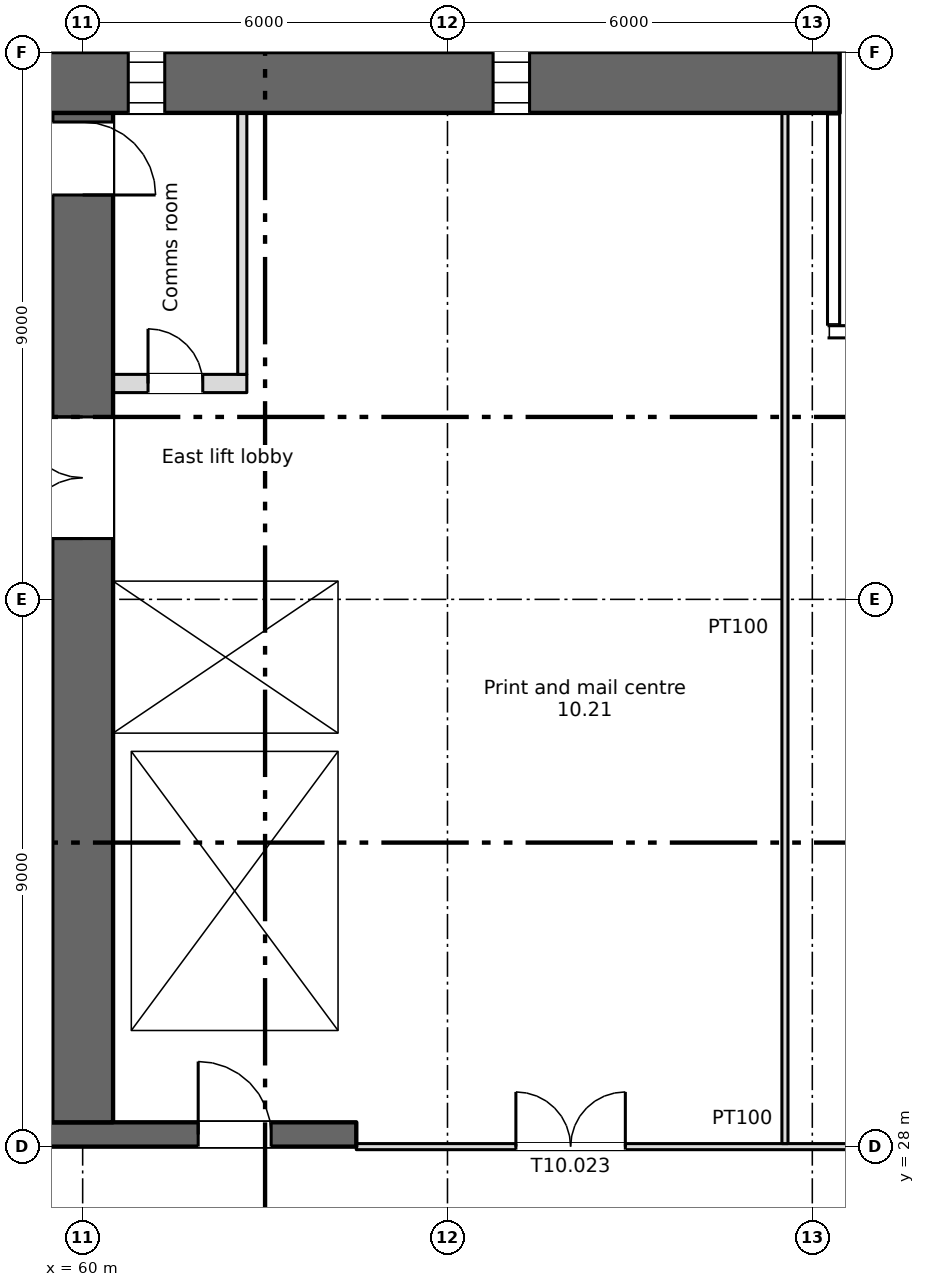
"""IFC4 building model, lengths in metres.
Left out: names, types, materials, properties, quantities, classifications, styles, units other than length and angle.
Written with IfcOpenShell. Run it as: python <this file> out.ifc"""

import sys

from ifc_helpers import new_model, si_unit, direction, frame, frame_2d, origin, place, context, subcontext, project, spatial, rectangle, extrude, element, fill, save


model = new_model("IFC4")
c1 = context("Model", 3, precision=1e-05, world=origin(), true_north=direction((0.0, 1.0)))
c2 = subcontext(c1, "Body", "Model", "MODEL_VIEW")
j1 = project(units=[si_unit("LENGTHUNIT", "METRE"), si_unit("PLANEANGLEUNIT", "RADIAN")], contexts=[c1])
p1 = place(None, origin())
s1 = spatial("IfcSite", under=j1, at=p1, CompositionType="ELEMENT")
p2 = place(p1, origin())
s2 = spatial("IfcBuilding", under=s1, at=p2, CompositionType="ELEMENT")
p3 = place(p2, frame((0.0, 0.0, 45.0)))
s3 = spatial("IfcBuildingStorey", under=s2, at=p3, CompositionType="ELEMENT", Elevation=45.0)
p4 = place(p3, frame((5.55, 45.5, 0.0), z_axis=(0.0, 0.0, 1.0), x_axis=(1.0, 0.0, 0.0)))
e1 = element("IfcWall", 1, at=p4, inside=s3, PredefinedType="SHEAR", context=c2, shape_type="SweptSolid", body=[
    extrude(rectangle(XDim=66.9, YDim=1.0, at=frame_2d((33.45, 0.0))), origin(), (0.0, 0.0, 1.0), 3.35),
])
p5 = place(p4, frame((1.2, 0.0, 0.6)))
e2 = element("IfcOpeningElement", 2, at=p5, cuts=e1, PredefinedType="OPENING", context=c2, shape_type="SweptSolid", body=[
    extrude(rectangle(XDim=0.6, YDim=2.4, at=frame_2d((0.3, 1.2))), frame((0.0, 0.51, 0.0), z_axis=(0.0, -1.0, 0.0), x_axis=(1.0, 0.0, 0.0)), (0.0, 0.0, 1.0), 1.02),
])
p6 = place(p4, frame((7.2, 0.0, 0.6)))
e3 = element("IfcOpeningElement", 3, at=p6, cuts=e1, PredefinedType="OPENING", context=c2, shape_type="SweptSolid", body=[
    extrude(rectangle(XDim=0.6, YDim=2.4, at=frame_2d((0.3, 1.2))), frame((0.0, 0.51, 0.0), z_axis=(0.0, -1.0, 0.0), x_axis=(1.0, 0.0, 0.0)), (0.0, 0.0, 1.0), 1.02),
])
p7 = place(p4, frame((55.2, 0.0, 0.6)))
e4 = element("IfcOpeningElement", 4, at=p7, cuts=e1, PredefinedType="OPENING", context=c2, shape_type="SweptSolid", body=[
    extrude(rectangle(XDim=0.6, YDim=2.4, at=frame_2d((0.3, 1.2))), frame((0.0, 0.51, 0.0), z_axis=(0.0, -1.0, 0.0), x_axis=(1.0, 0.0, 0.0)), (0.0, 0.0, 1.0), 1.02),
])
p8 = place(p4, frame((61.2, 0.0, 0.6)))
e5 = element("IfcOpeningElement", 5, at=p8, cuts=e1, PredefinedType="OPENING", context=c2, shape_type="SweptSolid", body=[
    extrude(rectangle(XDim=0.6, YDim=2.4, at=frame_2d((0.3, 1.2))), frame((0.0, 0.51, 0.0), z_axis=(0.0, -1.0, 0.0), x_axis=(1.0, 0.0, 0.0)), (0.0, 0.0, 1.0), 1.02),
])
p9 = place(p3, frame((6.7, 28.2, 0.0), z_axis=(0.0, 0.0, 1.0), x_axis=(1.0, 0.0, 0.0)))
e6 = element("IfcWall", 6, at=p9, inside=s3, PredefinedType="SHEAR", context=c2, shape_type="SweptSolid", body=[
    extrude(rectangle(XDim=57.8, YDim=0.4, at=frame_2d((28.9, 0.0))), origin(), (0.0, 0.0, 1.0), 3.35),
])
p10 = place(p9, frame((12.812, 0.0, 0.0)))
e7 = element("IfcOpeningElement", 7, at=p10, cuts=e6, PredefinedType="OPENING", context=c2, shape_type="SweptSolid", body=[
    extrude(rectangle(XDim=0.9, YDim=2.1, at=frame_2d((0.45, 1.05))), frame((0.0, 0.21, 0.0), z_axis=(0.0, -1.0, 0.0), x_axis=(1.0, 0.0, 0.0)), (0.0, 0.0, 1.0), 0.42),
])
p11 = place(p9, frame((15.387, 0.0, 0.0)))
e8 = element("IfcOpeningElement", 8, at=p11, cuts=e6, PredefinedType="OPENING", context=c2, shape_type="SweptSolid", body=[
    extrude(rectangle(XDim=0.9, YDim=2.1, at=frame_2d((0.45, 1.05))), frame((0.0, 0.21, 0.0), z_axis=(0.0, -1.0, 0.0), x_axis=(1.0, 0.0, 0.0)), (0.0, 0.0, 1.0), 0.42),
])
p12 = place(p9, frame((48.312, 0.0, 0.0)))
e9 = element("IfcOpeningElement", 9, at=p12, cuts=e6, PredefinedType="OPENING", context=c2, shape_type="SweptSolid", body=[
    extrude(rectangle(XDim=0.9, YDim=2.1, at=frame_2d((0.45, 1.05))), frame((0.0, 0.21, 0.0), z_axis=(0.0, -1.0, 0.0), x_axis=(1.0, 0.0, 0.0)), (0.0, 0.0, 1.0), 0.42),
])
p13 = place(p9, frame((50.887, 0.0, 0.0)))
e10 = element("IfcOpeningElement", 10, at=p13, cuts=e6, PredefinedType="OPENING", context=c2, shape_type="SweptSolid", body=[
    extrude(rectangle(XDim=0.9, YDim=2.1, at=frame_2d((0.45, 1.05))), frame((0.0, 0.21, 0.0), z_axis=(0.0, -1.0, 0.0), x_axis=(1.0, 0.0, 0.0)), (0.0, 0.0, 1.0), 0.42),
])
p14 = place(p9, frame((0.562, 0.0, 0.0)))
e11 = element("IfcOpeningElement", 11, at=p14, cuts=e6, PredefinedType="OPENING", context=c2, shape_type="SweptSolid", body=[
    extrude(rectangle(XDim=0.9, YDim=2.1, at=frame_2d((0.45, 1.05))), frame((0.0, 0.21, 0.0), z_axis=(0.0, -1.0, 0.0), x_axis=(1.0, 0.0, 0.0)), (0.0, 0.0, 1.0), 0.42),
])
p15 = place(p9, frame((2.137, 0.0, 0.0)))
e12 = element("IfcOpeningElement", 12, at=p15, cuts=e6, PredefinedType="OPENING", context=c2, shape_type="SweptSolid", body=[
    extrude(rectangle(XDim=0.9, YDim=2.1, at=frame_2d((0.45, 1.05))), frame((0.0, 0.21, 0.0), z_axis=(0.0, -1.0, 0.0), x_axis=(1.0, 0.0, 0.0)), (0.0, 0.0, 1.0), 0.42),
])
p16 = place(p9, frame((4.7, 0.0, 0.0)))
e13 = element("IfcOpeningElement", 13, at=p16, cuts=e6, PredefinedType="OPENING", context=c2, shape_type="SweptSolid", body=[
    extrude(rectangle(XDim=1.2, YDim=2.1, at=frame_2d((0.6, 1.05))), frame((0.0, 0.21, 0.0), z_axis=(0.0, -1.0, 0.0), x_axis=(1.0, 0.0, 0.0)), (0.0, 0.0, 1.0), 0.42),
])
p17 = place(p9, frame((31.7, 0.0, 0.0)))
e14 = element("IfcOpeningElement", 14, at=p17, cuts=e6, PredefinedType="OPENING", context=c2, shape_type="SweptSolid", body=[
    extrude(rectangle(XDim=1.2, YDim=2.1, at=frame_2d((0.6, 1.05))), frame((0.0, 0.21, 0.0), z_axis=(0.0, -1.0, 0.0), x_axis=(1.0, 0.0, 0.0)), (0.0, 0.0, 1.0), 0.42),
])
p18 = place(p9, frame((55.2, 0.0, 0.0)))
e15 = element("IfcOpeningElement", 15, at=p18, cuts=e6, PredefinedType="OPENING", context=c2, shape_type="SweptSolid", body=[
    extrude(rectangle(XDim=1.2, YDim=2.1, at=frame_2d((0.6, 1.05))), frame((0.0, 0.21, 0.0), z_axis=(0.0, -1.0, 0.0), x_axis=(1.0, 0.0, 0.0)), (0.0, 0.0, 1.0), 0.42),
])
p19 = place(p9, frame((21.7, 0.0, 0.0)))
e16 = element("IfcOpeningElement", 16, at=p19, cuts=e6, PredefinedType="OPENING", context=c2, shape_type="SweptSolid", body=[
    extrude(rectangle(XDim=1.2, YDim=2.1, at=frame_2d((0.6, 1.05))), frame((0.0, 0.21, 0.0), z_axis=(0.0, -1.0, 0.0), x_axis=(1.0, 0.0, 0.0)), (0.0, 0.0, 1.0), 0.42),
])
p20 = place(p9, frame((41.7, 0.0, 0.0)))
e17 = element("IfcOpeningElement", 17, at=p20, cuts=e6, PredefinedType="OPENING", context=c2, shape_type="SweptSolid", body=[
    extrude(rectangle(XDim=1.2, YDim=2.1, at=frame_2d((0.6, 1.05))), frame((0.0, 0.21, 0.0), z_axis=(0.0, -1.0, 0.0), x_axis=(1.0, 0.0, 0.0)), (0.0, 0.0, 1.0), 0.42),
])
p21 = place(p9, frame((24.85, 0.0, 0.0)))
e18 = element("IfcOpeningElement", 18, at=p21, cuts=e6, PredefinedType="OPENING", context=c2, shape_type="SweptSolid", body=[
    extrude(rectangle(XDim=2.4, YDim=2.1, at=frame_2d((1.2, 1.05))), frame((0.0, 0.21, 0.0), z_axis=(0.0, -1.0, 0.0), x_axis=(1.0, 0.0, 0.0)), (0.0, 0.0, 1.0), 0.42),
])
p22 = place(p9, frame((37.35, 0.0, 0.0)))
e19 = element("IfcOpeningElement", 19, at=p22, cuts=e6, PredefinedType="OPENING", context=c2, shape_type="SweptSolid", body=[
    extrude(rectangle(XDim=2.4, YDim=2.1, at=frame_2d((1.2, 1.05))), frame((0.0, 0.21, 0.0), z_axis=(0.0, -1.0, 0.0), x_axis=(1.0, 0.0, 0.0)), (0.0, 0.0, 1.0), 0.42),
])
p23 = place(p9, frame((7.85, 0.0, 0.0)))
e20 = element("IfcOpeningElement", 20, at=p23, cuts=e6, PredefinedType="OPENING", context=c2, shape_type="SweptSolid", body=[
    extrude(rectangle(XDim=2.4, YDim=2.1, at=frame_2d((1.2, 1.05))), frame((0.0, 0.21, 0.0), z_axis=(0.0, -1.0, 0.0), x_axis=(1.0, 0.0, 0.0)), (0.0, 0.0, 1.0), 0.42),
])
p24 = place(p9, frame((28.85, 0.0, 0.0)))
e21 = element("IfcOpeningElement", 21, at=p24, cuts=e6, PredefinedType="OPENING", context=c2, shape_type="SweptSolid", body=[
    extrude(rectangle(XDim=0.9, YDim=2.1, at=frame_2d((0.45, 1.05))), frame((0.0, 0.21, 0.0), z_axis=(0.0, -1.0, 0.0), x_axis=(1.0, 0.0, 0.0)), (0.0, 0.0, 1.0), 0.42),
])
p25 = place(p9, frame((34.85, 0.0, 0.0)))
e22 = element("IfcOpeningElement", 22, at=p25, cuts=e6, PredefinedType="OPENING", context=c2, shape_type="SweptSolid", body=[
    extrude(rectangle(XDim=0.9, YDim=2.1, at=frame_2d((0.45, 1.05))), frame((0.0, 0.21, 0.0), z_axis=(0.0, -1.0, 0.0), x_axis=(1.0, 0.0, 0.0)), (0.0, 0.0, 1.0), 0.42),
])
p26 = place(p3, frame((64.35, 34.8, 0.0), z_axis=(0.0, 0.0, 1.0), x_axis=(0.0, 1.0, 0.0)))
e23 = element("IfcWall", 23, at=p26, inside=s3, PredefinedType="SHEAR", context=c2, shape_type="SweptSolid", body=[
    extrude(rectangle(XDim=10.2, YDim=0.3, at=frame_2d((5.1, 0.0))), origin(), (0.0, 0.0, 1.0), 3.35),
])
p27 = place(p3, frame((60.0, 28.4, 0.0), z_axis=(0.0, 0.0, 1.0), x_axis=(0.0, 1.0, 0.0)))
e24 = element("IfcWall", 24, at=p27, inside=s3, PredefinedType="SHEAR", context=c2, shape_type="SweptSolid", body=[
    extrude(rectangle(XDim=16.6, YDim=1.0, at=frame_2d((8.3, 0.0))), origin(), (0.0, 0.0, 1.0), 3.35),
])
p28 = place(p27, frame((9.6, 0.0, 0.0)))
e25 = element("IfcOpeningElement", 25, at=p28, cuts=e24, PredefinedType="OPENING", context=c2, shape_type="SweptSolid", body=[
    extrude(rectangle(XDim=2.0, YDim=2.1, at=frame_2d((1.0, 1.05))), frame((0.0, 0.51, 0.0), z_axis=(0.0, -1.0, 0.0), x_axis=(1.0, 0.0, 0.0)), (0.0, 0.0, 1.0), 1.02),
])
p29 = place(p27, frame((15.25, 0.0, 0.0)))
e26 = element("IfcOpeningElement", 26, at=p29, cuts=e24, PredefinedType="OPENING", context=c2, shape_type="SweptSolid", body=[
    extrude(rectangle(XDim=1.2, YDim=2.1, at=frame_2d((0.6, 1.05))), frame((0.0, 0.51, 0.0), z_axis=(0.0, -1.0, 0.0), x_axis=(1.0, 0.0, 0.0)), (0.0, 0.0, 1.0), 1.02),
])
for number, where, z_axis, x_axis in (
    (27, (60.65, 28.4, 0.0), (0.0, 0.0, 1.0), (0.0, 1.0, 0.0)),
    (28, (64.35, 28.4, 0.0), (0.0, 0.0, 1.0), (0.0, 1.0, 0.0)),
):
    element("IfcWall", number, at=place(p3, frame(where, z_axis=z_axis, x_axis=x_axis)), inside=s3, PredefinedType="SHEAR", context=c2, shape_type="SweptSolid", body=[
        extrude(rectangle(XDim=6.1, YDim=0.3, at=frame_2d((3.05, 0.0))), origin(), (0.0, 0.0, 1.0), 3.35),
    ])
p30 = place(p3, frame((47.3, 34.65, 0.0), z_axis=(0.0, 0.0, 1.0), x_axis=(1.0, 0.0, 0.0)))
e29 = element("IfcWall", 29, at=p30, inside=s3, PredefinedType="SHEAR", context=c2, shape_type="SweptSolid", body=[
    extrude(rectangle(XDim=12.2, YDim=0.3, at=frame_2d((6.1, 0.0))), origin(), (0.0, 0.0, 1.0), 3.35),
])
p31 = place(p30, frame((1.3, 0.0, 0.0)))
e30 = element("IfcOpeningElement", 30, at=p31, cuts=e29, PredefinedType="OPENING", context=c2, shape_type="SweptSolid", body=[
    extrude(rectangle(XDim=1.1, YDim=2.1, at=frame_2d((0.55, 1.05))), frame((0.0, 0.16, 0.0), z_axis=(0.0, -1.0, 0.0), x_axis=(1.0, 0.0, 0.0)), (0.0, 0.0, 1.0), 0.32),
])
p32 = place(p3, frame((60.5, 34.65, 0.0), z_axis=(0.0, 0.0, 1.0), x_axis=(1.0, 0.0, 0.0)))
e31 = element("IfcWall", 31, at=p32, inside=s3, PredefinedType="SHEAR", context=c2, shape_type="SweptSolid", body=[
    extrude(rectangle(XDim=4.0, YDim=0.3, at=frame_2d((2.0, 0.0))), origin(), (0.0, 0.0, 1.0), 3.35),
])
p33 = place(p3, frame((60.5, 37.45, 0.0), z_axis=(0.0, 0.0, 1.0), x_axis=(1.0, 0.0, 0.0)))
e32 = element("IfcWall", 32, at=p33, inside=s3, PredefinedType="SHEAR", context=c2, shape_type="SweptSolid", body=[
    extrude(rectangle(XDim=3.7, YDim=0.3, at=frame_2d((1.85, 0.0))), origin(), (0.0, 0.0, 1.0), 3.35),
])
p34 = place(p33, frame((1.3, 0.0, 0.0)))
e33 = element("IfcOpeningElement", 33, at=p34, cuts=e32, PredefinedType="OPENING", context=c2, shape_type="SweptSolid", body=[
    extrude(rectangle(XDim=1.1, YDim=2.1, at=frame_2d((0.55, 1.05))), frame((0.0, 0.16, 0.0), z_axis=(0.0, -1.0, 0.0), x_axis=(1.0, 0.0, 0.0)), (0.0, 0.0, 1.0), 0.32),
])
p35 = place(p3, frame((60.5, 40.55, 0.0), z_axis=(0.0, 0.0, 1.0), x_axis=(1.0, 0.0, 0.0)))
e34 = element("IfcWall", 34, at=p35, inside=s3, PredefinedType="PARTITIONING", context=c2, shape_type="SweptSolid", body=[
    extrude(rectangle(XDim=2.2, YDim=0.3, at=frame_2d((1.1, 0.0))), origin(), (0.0, 0.0, 1.0), 3.35),
])
p36 = place(p35, frame((0.575, 0.0, 0.0)))
e35 = element("IfcOpeningElement", 35, at=p36, cuts=e34, PredefinedType="OPENING", context=c2, shape_type="SweptSolid", body=[
    extrude(rectangle(XDim=0.9, YDim=2.1, at=frame_2d((0.45, 1.05))), frame((0.0, 0.16, 0.0), z_axis=(0.0, -1.0, 0.0), x_axis=(1.0, 0.0, 0.0)), (0.0, 0.0, 1.0), 0.32),
])
p37 = place(p3, frame((62.625, 40.7, 0.0), z_axis=(0.0, 0.0, 1.0), x_axis=(0.0, 1.0, 0.0)))
e36 = element("IfcWall", 36, at=p37, inside=s3, PredefinedType="PARTITIONING", context=c2, shape_type="SweptSolid", body=[
    extrude(rectangle(XDim=4.3, YDim=0.15, at=frame_2d((2.15, 0.0))), origin(), (0.0, 0.0, 1.0), 3.35),
])
p38 = place(p3, frame((64.5, 28.0, 0.0), z_axis=(0.0, 0.0, 1.0), x_axis=(1.0, 0.0, 0.0)))
e37 = element("IfcWall", 37, at=p38, inside=s3, PredefinedType="PARTITIONING", context=c2, shape_type="SweptSolid", body=[
    extrude(rectangle(XDim=12.7, YDim=0.1, at=frame_2d((6.35, 0.0))), origin(), (0.0, 0.0, 1.0), 3.35),
])
p39 = place(p38, frame((8.975, 0.0, 0.0)))
e38 = element("IfcOpeningElement", 38, at=p39, cuts=e37, PredefinedType="OPENING", context=c2, shape_type="SweptSolid", body=[
    extrude(rectangle(XDim=1.8, YDim=2.1, at=frame_2d((0.9, 1.05))), frame((0.0, 0.06, 0.0), z_axis=(0.0, -1.0, 0.0), x_axis=(1.0, 0.0, 0.0)), (0.0, 0.0, 1.0), 0.12),
])
p40 = place(p38, frame((2.625, 0.0, 0.0)))
e39 = element("IfcOpeningElement", 39, at=p40, cuts=e37, PredefinedType="OPENING", context=c2, shape_type="SweptSolid", body=[
    extrude(rectangle(XDim=1.8, YDim=2.1, at=frame_2d((0.9, 1.05))), frame((0.0, 0.06, 0.0), z_axis=(0.0, -1.0, 0.0), x_axis=(1.0, 0.0, 0.0)), (0.0, 0.0, 1.0), 0.12),
])
p41 = place(p3, frame((71.55, 28.05, 0.0), z_axis=(0.0, 0.0, 1.0), x_axis=(0.0, 1.0, 0.0)))
e40 = element("IfcWall", 40, at=p41, inside=s3, PredefinedType="PARTITIONING", context=c2, shape_type="SweptSolid", body=[
    extrude(rectangle(XDim=16.95, YDim=0.1, at=frame_2d((8.475, 0.0))), origin(), (0.0, 0.0, 1.0), 3.35),
])
p42 = place(p7, origin())
e41 = element("IfcWindow", 41, at=p42, inside=s3, PartitioningType="SINGLE_PANEL", PredefinedType="WINDOW", context=c2, shape_type="SweptSolid", body=[
    extrude(rectangle(XDim=0.6, YDim=2.4, at=frame_2d((0.3, 1.2))), frame((0.0, 0.03, 0.0), z_axis=(0.0, -1.0, 0.0), x_axis=(1.0, 0.0, 0.0)), (0.0, 0.0, 1.0), 0.06),
])
fill(e4, e41)
p43 = place(p8, origin())
e42 = element("IfcWindow", 42, at=p43, inside=s3, PartitioningType="SINGLE_PANEL", PredefinedType="WINDOW", context=c2, shape_type="SweptSolid", body=[
    extrude(rectangle(XDim=0.6, YDim=2.4, at=frame_2d((0.3, 1.2))), frame((0.0, 0.03, 0.0), z_axis=(0.0, -1.0, 0.0), x_axis=(1.0, 0.0, 0.0)), (0.0, 0.0, 1.0), 0.06),
])
fill(e5, e42)
p44 = place(p36, origin())
e43 = element("IfcDoor", 43, at=p44, inside=s3, OperationType="SINGLE_SWING_LEFT", PredefinedType="DOOR", context=c2, shape_type="SweptSolid", body=[
    extrude(rectangle(XDim=0.9, YDim=2.1, at=frame_2d((0.45, 1.05))), frame((0.0, 0.025, 0.0), z_axis=(0.0, -1.0, 0.0), x_axis=(1.0, 0.0, 0.0)), (0.0, 0.0, 1.0), 0.05),
])
fill(e35, e43)
p45 = place(p34, origin())
e44 = element("IfcDoor", 44, at=p45, inside=s3, OperationType="SLIDING_TO_LEFT", PredefinedType="DOOR", context=c2, shape_type="SweptSolid", body=[
    extrude(rectangle(XDim=1.1, YDim=2.1, at=frame_2d((0.55, 1.05))), frame((0.0, 0.025, 0.0), z_axis=(0.0, -1.0, 0.0), x_axis=(1.0, 0.0, 0.0)), (0.0, 0.0, 1.0), 0.05),
])
fill(e33, e44)
p46 = place(p18, origin())
e45 = element("IfcDoor", 45, at=p46, inside=s3, OperationType="SINGLE_SWING_LEFT", PredefinedType="DOOR", context=c2, shape_type="SweptSolid", body=[
    extrude(rectangle(XDim=1.2, YDim=2.1, at=frame_2d((0.6, 1.05))), frame((0.0, 0.025, 0.0), z_axis=(0.0, -1.0, 0.0), x_axis=(1.0, 0.0, 0.0)), (0.0, 0.0, 1.0), 0.05),
])
fill(e15, e45)
p47 = place(p28, origin())
e46 = element("IfcDoor", 46, at=p47, inside=s3, OperationType="DOUBLE_DOOR_SINGLE_SWING", PredefinedType="DOOR", context=c2, shape_type="SweptSolid", body=[
    extrude(rectangle(XDim=2.0, YDim=2.1, at=frame_2d((1.0, 1.05))), frame((0.0, 0.025, 0.0), z_axis=(0.0, -1.0, 0.0), x_axis=(1.0, 0.0, 0.0)), (0.0, 0.0, 1.0), 0.05),
])
fill(e25, e46)
p48 = place(p29, origin())
e47 = element("IfcDoor", 47, at=p48, inside=s3, OperationType="SINGLE_SWING_LEFT", PredefinedType="DOOR", context=c2, shape_type="SweptSolid", body=[
    extrude(rectangle(XDim=1.2, YDim=2.1, at=frame_2d((0.6, 1.05))), frame((0.0, 0.025, 0.0), z_axis=(0.0, -1.0, 0.0), x_axis=(1.0, 0.0, 0.0)), (0.0, 0.0, 1.0), 0.05),
])
fill(e26, e47)
p49 = place(p40, origin())
e48 = element("IfcDoor", 48, at=p49, inside=s3, OperationType="DOUBLE_DOOR_SINGLE_SWING", PredefinedType="DOOR", context=c2, shape_type="SweptSolid", body=[
    extrude(rectangle(XDim=1.8, YDim=2.1, at=frame_2d((0.9, 1.05))), frame((0.0, 0.025, 0.0), z_axis=(0.0, -1.0, 0.0), x_axis=(1.0, 0.0, 0.0)), (0.0, 0.0, 1.0), 0.05),
])
fill(e39, e48)
save(model, sys.argv[1])
